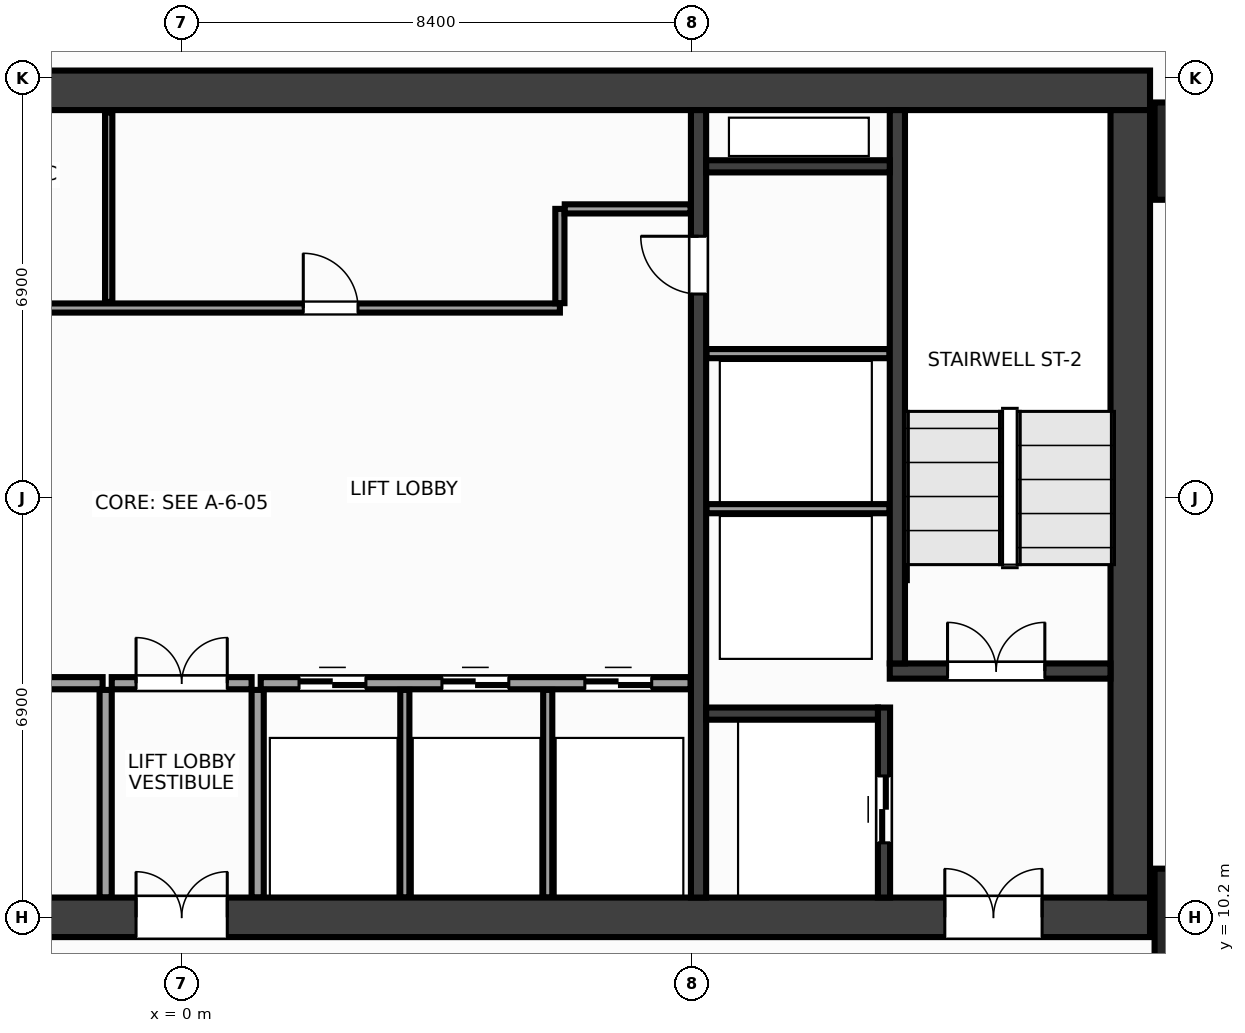
"""IFC4 building model, lengths in metres.
Left out: names, types, materials, properties, quantities, classifications, styles, units other than length and angle.
Written with IfcOpenShell. Run it as: python <this file> out.ifc"""

import sys

from ifc_helpers import new_model, si_unit, direction, frame, frame_2d, origin, origin_2d, place, context, subcontext, project, spatial, rectangle, extrude, source, transform, mapped, element, fill, save


model = new_model("IFC4")
c1 = context("Model", 3, precision=1e-05, world=origin(), true_north=direction((0.0, 1.0)))
c2 = subcontext(c1, "Body", "Model", "MODEL_VIEW")
j1 = project(units=[si_unit("LENGTHUNIT", "METRE"), si_unit("PLANEANGLEUNIT", "RADIAN")], contexts=[c1])
p1 = place(None, origin())
s1 = spatial("IfcSite", under=j1, at=p1, CompositionType="ELEMENT")
p2 = place(p1, origin())
s2 = spatial("IfcBuilding", under=s1, at=p2, CompositionType="ELEMENT")
p3 = place(p2, frame((0.0, 0.0, 149.6)))
s3 = spatial("IfcBuildingStorey", under=s2, at=p3, CompositionType="ELEMENT", Elevation=149.6)
m1 = source(origin(), c2, "Body", "SweptSolid", [
    extrude(rectangle(XDim=31.85, YDim=0.65, at=frame_2d((15.925, 0.0))), origin(), (0.0, 0.0, 1.0), 3.6),
])
p4 = place(p3, frame((-15.925, 23.8, 0.0), z_axis=(0.0, 0.0, 1.0), x_axis=(1.0, 0.0, 0.0)))
e1 = element("IfcWall", 1, at=p4, inside=s3, PredefinedType="SHEAR", context=c2, shape_type="MappedRepresentation", body=[
    mapped(m1, transform((0.0, 0.0, 0.0), x_axis=(1.0, 0.0, 0.0), y_axis=(0.0, 1.0, 0.0), z_axis=(0.0, 0.0, 1.0), scale=1.0)),
])
p5 = place(p3, frame((-15.925, 10.2, 0.0), z_axis=(0.0, 0.0, 1.0), x_axis=(1.0, 0.0, 0.0)))
e2 = element("IfcWall", 2, at=p5, inside=s3, PredefinedType="SHEAR", context=c2, shape_type="MappedRepresentation", body=[
    mapped(m1, transform((0.0, 0.0, 0.0), x_axis=(1.0, 0.0, 0.0), y_axis=(0.0, 1.0, 0.0), z_axis=(0.0, 0.0, 1.0), scale=1.0)),
])
p6 = place(p5, frame((1.775, 0.0, 0.0)))
e3 = element("IfcOpeningElement", 3, at=p6, cuts=e2, PredefinedType="OPENING", context=c2, shape_type="SweptSolid", body=[
    extrude(rectangle(XDim=1.6, YDim=2.15, at=frame_2d((0.8, 1.075))), frame((0.0, 0.337, 0.0), z_axis=(0.0, -1.0, 0.0), x_axis=(1.0, 0.0, 0.0)), (0.0, 0.0, 1.0), 0.674),
])
p7 = place(p5, frame((28.475, 0.0, 0.0)))
e4 = element("IfcOpeningElement", 4, at=p7, cuts=e2, PredefinedType="OPENING", context=c2, shape_type="SweptSolid", body=[
    extrude(rectangle(XDim=1.6, YDim=2.15, at=frame_2d((0.8, 1.075))), frame((0.0, 0.337, 0.0), z_axis=(0.0, -1.0, 0.0), x_axis=(1.0, 0.0, 0.0)), (0.0, 0.0, 1.0), 0.674),
])
p8 = place(p5, frame((15.175, 0.0, 0.0)))
e5 = element("IfcOpeningElement", 5, at=p8, cuts=e2, PredefinedType="OPENING", context=c2, shape_type="SweptSolid", body=[
    extrude(rectangle(XDim=1.5, YDim=2.2, at=frame_2d((0.75, 1.1))), frame((0.0, 0.337, 0.0), z_axis=(0.0, -1.0, 0.0), x_axis=(1.0, 0.0, 0.0)), (0.0, 0.0, 1.0), 0.674),
])
m2 = source(origin(), c2, "Body", "SweptSolid", [
    extrude(rectangle(XDim=12.95, YDim=0.65, at=frame_2d((6.475, 0.0))), origin(), (0.0, 0.0, 1.0), 3.6),
])
p9 = place(p3, frame((15.6, 10.525, 0.0), z_axis=(0.0, 0.0, 1.0), x_axis=(0.0, 1.0, 0.0)))
e6 = element("IfcWall", 6, at=p9, inside=s3, PredefinedType="SHEAR", context=c2, shape_type="MappedRepresentation", body=[
    mapped(m2, transform((0.0, 0.0, 0.0), x_axis=(1.0, 0.0, 0.0), y_axis=(0.0, 1.0, 0.0), z_axis=(0.0, 0.0, 1.0), scale=1.0)),
])
m3 = source(origin(), c2, "Body", "SweptSolid", [
    extrude(rectangle(XDim=12.95, YDim=0.25, at=frame_2d((6.475, 0.0))), origin(), (0.0, 0.0, 1.0), 3.6),
])
p10 = place(p3, frame((8.5, 10.525, 0.0), z_axis=(0.0, 0.0, 1.0), x_axis=(0.0, 1.0, 0.0)))
e7 = element("IfcWall", 7, at=p10, inside=s3, PredefinedType="SHEAR", context=c2, shape_type="MappedRepresentation", body=[
    mapped(m3, transform((0.0, 0.0, 0.0), x_axis=(1.0, 0.0, 0.0), y_axis=(0.0, 1.0, 0.0), z_axis=(0.0, 0.0, 1.0), scale=1.0)),
])
p11 = place(p10, frame((9.925, 0.0, 0.0)))
e8 = element("IfcOpeningElement", 8, at=p11, cuts=e7, PredefinedType="OPENING", context=c2, shape_type="SweptSolid", body=[
    extrude(rectangle(XDim=0.95, YDim=2.15, at=frame_2d((0.475, 1.075))), frame((0.0, 0.137, 0.0), z_axis=(0.0, -1.0, 0.0), x_axis=(1.0, 0.0, 0.0)), (0.0, 0.0, 1.0), 0.274),
])
m4 = source(origin(), c2, "Body", "SweptSolid", [
    extrude(rectangle(XDim=3.63, YDim=0.25, at=frame_2d((1.815, 0.0))), origin(), (0.0, 0.0, 1.0), 3.6),
])
p12 = place(p3, frame((11.645, 14.25, 0.0), z_axis=(0.0, 0.0, 1.0), x_axis=(1.0, 0.0, 0.0)))
e9 = element("IfcWall", 9, at=p12, inside=s3, PredefinedType="SHEAR", context=c2, shape_type="MappedRepresentation", body=[
    mapped(m4, transform((0.0, 0.0, 0.0), x_axis=(1.0, 0.0, 0.0), y_axis=(0.0, 1.0, 0.0), z_axis=(0.0, 0.0, 1.0), scale=1.0)),
])
p13 = place(p12, frame((0.95, 0.0, 0.0)))
e10 = element("IfcOpeningElement", 10, at=p13, cuts=e9, PredefinedType="OPENING", context=c2, shape_type="SweptSolid", body=[
    extrude(rectangle(XDim=1.6, YDim=2.15, at=frame_2d((0.8, 1.075))), frame((0.0, 0.137, 0.0), z_axis=(0.0, -1.0, 0.0), x_axis=(1.0, 0.0, 0.0)), (0.0, 0.0, 1.0), 0.274),
])
m5 = source(origin(), c2, "Body", "SweptSolid", [
    extrude(rectangle(XDim=9.1, YDim=0.25, at=frame_2d((4.55, 0.0))), origin(), (0.0, 0.0, 1.0), 3.6),
])
p14 = place(p3, frame((11.77, 14.375, 0.0), z_axis=(0.0, 0.0, 1.0), x_axis=(0.0, 1.0, 0.0)))
e11 = element("IfcWall", 11, at=p14, inside=s3, PredefinedType="SHEAR", context=c2, shape_type="MappedRepresentation", body=[
    mapped(m5, transform((0.0, 0.0, 0.0), x_axis=(1.0, 0.0, 0.0), y_axis=(0.0, 1.0, 0.0), z_axis=(0.0, 0.0, 1.0), scale=1.0)),
])
m6 = source(origin(), c2, "Body", "SweptSolid", [
    extrude(rectangle(XDim=3.125, YDim=0.2, at=frame_2d((1.562, 0.0))), origin(), (0.0, 0.0, 1.0), 3.6),
])
p15 = place(p3, frame((11.55, 10.525, 0.0), z_axis=(0.0, 0.0, 1.0), x_axis=(0.0, 1.0, 0.0)))
e12 = element("IfcWall", 12, at=p15, inside=s3, PredefinedType="SHEAR", context=c2, shape_type="MappedRepresentation", body=[
    mapped(m6, transform((0.0, 0.0, 0.0), x_axis=(1.0, 0.0, 0.0), y_axis=(0.0, 1.0, 0.0), z_axis=(0.0, 0.0, 1.0), scale=1.0)),
])
p16 = place(p15, frame((0.9, 0.0, 0.0)))
e13 = element("IfcOpeningElement", 13, at=p16, cuts=e12, PredefinedType="OPENING", context=c2, shape_type="SweptSolid", body=[
    extrude(rectangle(XDim=1.1, YDim=2.15, at=frame_2d((0.55, 1.075))), frame((0.0, 0.112, 0.0), z_axis=(0.0, -1.0, 0.0), x_axis=(1.0, 0.0, 0.0)), (0.0, 0.0, 1.0), 0.224),
])
m7 = source(origin(), c2, "Body", "SweptSolid", [
    extrude(rectangle(XDim=2.825, YDim=0.2, at=frame_2d((1.413, 0.0))), origin(), (0.0, 0.0, 1.0), 3.6),
])
p17 = place(p3, frame((8.625, 13.55, 0.0), z_axis=(0.0, 0.0, 1.0), x_axis=(1.0, 0.0, 0.0)))
e14 = element("IfcWall", 14, at=p17, inside=s3, PredefinedType="SHEAR", context=c2, shape_type="MappedRepresentation", body=[
    mapped(m7, transform((0.0, 0.0, 0.0), x_axis=(1.0, 0.0, 0.0), y_axis=(0.0, 1.0, 0.0), z_axis=(0.0, 0.0, 1.0), scale=1.0)),
])
m8 = source(origin(), c2, "Body", "SweptSolid", [
    extrude(rectangle(XDim=3.02, YDim=0.2, at=frame_2d((1.51, 0.0))), origin(), (0.0, 0.0, 1.0), 3.6),
])
p18 = place(p3, frame((8.625, 22.55, 0.0), z_axis=(0.0, 0.0, 1.0), x_axis=(1.0, 0.0, 0.0)))
e15 = element("IfcWall", 15, at=p18, inside=s3, PredefinedType="SHEAR", context=c2, shape_type="MappedRepresentation", body=[
    mapped(m8, transform((0.0, 0.0, 0.0), x_axis=(1.0, 0.0, 0.0), y_axis=(0.0, 1.0, 0.0), z_axis=(0.0, 0.0, 1.0), scale=1.0)),
])
m9 = source(origin(), c2, "Body", "SweptSolid", [
    extrude(rectangle(XDim=1.6, YDim=1.6, at=origin_2d()), origin(), (0.0, 0.0, 1.0), 3.6),
])
for number, where, z_axis, x_axis in (
    (16, (16.8, 10.2, 0.0), (0.0, 0.0, 1.0), (1.0, 0.0, 0.0)),
    (17, (16.8, 22.8, 0.0), (0.0, 0.0, 1.0), (1.0, 0.0, 0.0)),
):
    element("IfcColumn", number, at=place(p3, frame(where, z_axis=z_axis, x_axis=x_axis)), inside=s3, PredefinedType="COLUMN", context=c2, shape_type="MappedRepresentation", body=[
        mapped(m9, transform((0.0, 0.0, 0.0), x_axis=(1.0, 0.0, 0.0), y_axis=(0.0, 1.0, 0.0), z_axis=(0.0, 0.0, 1.0), scale=1.0)),
    ])
m10 = source(origin(), c2, "Body", "SweptSolid", [
    extrude(rectangle(XDim=3.01, YDim=0.15, at=frame_2d((1.505, 0.0))), origin(), (0.0, 0.0, 1.0), 3.38),
])
for number, where, z_axis, x_axis in (
    (18, (8.63, 16.92, 0.0), (0.0, 0.0, 1.0), (1.0, 0.0, 0.0)),
    (19, (8.63, 19.47, 0.0), (0.0, 0.0, 1.0), (1.0, 0.0, 0.0)),
):
    element("IfcWall", number, at=place(p3, frame(where, z_axis=z_axis, x_axis=x_axis)), inside=s3, PredefinedType="PARTITIONING", context=c2, shape_type="MappedRepresentation", body=[
        mapped(m10, transform((0.0, 0.0, 0.0), x_axis=(1.0, 0.0, 0.0), y_axis=(0.0, 1.0, 0.0), z_axis=(0.0, 0.0, 1.0), scale=1.0)),
    ])
m11 = source(origin(), c2, "Body", "SweptSolid", [
    extrude(rectangle(XDim=7.07, YDim=0.2, at=frame_2d((3.535, 0.0))), origin(), (0.0, 0.0, 1.0), 3.38),
])
p19 = place(p3, frame((-8.37, 14.05, 0.0), z_axis=(0.0, 0.0, 1.0), x_axis=(1.0, 0.0, 0.0)))
e20 = element("IfcWall", 20, at=p19, inside=s3, PredefinedType="PARTITIONING", context=c2, shape_type="MappedRepresentation", body=[
    mapped(m11, transform((0.0, 0.0, 0.0), x_axis=(1.0, 0.0, 0.0), y_axis=(0.0, 1.0, 0.0), z_axis=(0.0, 0.0, 1.0), scale=1.0)),
])
p20 = place(p19, frame((2.8, 0.0, 0.0)))
e21 = element("IfcOpeningElement", 21, at=p20, cuts=e20, PredefinedType="OPENING", context=c2, shape_type="SweptSolid", body=[
    extrude(rectangle(XDim=0.98, YDim=2.15, at=frame_2d((0.49, 1.075))), frame((0.0, 0.112, 0.0), z_axis=(0.0, -1.0, 0.0), x_axis=(1.0, 0.0, 0.0)), (0.0, 0.0, 1.0), 0.224),
])
p21 = place(p3, frame((1.3, 14.05, 0.0), z_axis=(0.0, 0.0, 1.0), x_axis=(1.0, 0.0, 0.0)))
e22 = element("IfcWall", 22, at=p21, inside=s3, PredefinedType="PARTITIONING", context=c2, shape_type="MappedRepresentation", body=[
    mapped(m11, transform((0.0, 0.0, 0.0), x_axis=(1.0, 0.0, 0.0), y_axis=(0.0, 1.0, 0.0), z_axis=(0.0, 0.0, 1.0), scale=1.0)),
])
p22 = place(p21, frame((0.63, 0.0, 0.0)))
e23 = element("IfcOpeningElement", 23, at=p22, cuts=e22, PredefinedType="OPENING", context=c2, shape_type="SweptSolid", body=[
    extrude(rectangle(XDim=1.1, YDim=2.15, at=frame_2d((0.55, 1.075))), frame((0.0, 0.112, 0.0), z_axis=(0.0, -1.0, 0.0), x_axis=(1.0, 0.0, 0.0)), (0.0, 0.0, 1.0), 0.224),
])
p23 = place(p21, frame((2.98, 0.0, 0.0)))
e24 = element("IfcOpeningElement", 24, at=p23, cuts=e22, PredefinedType="OPENING", context=c2, shape_type="SweptSolid", body=[
    extrude(rectangle(XDim=1.1, YDim=2.15, at=frame_2d((0.55, 1.075))), frame((0.0, 0.112, 0.0), z_axis=(0.0, -1.0, 0.0), x_axis=(1.0, 0.0, 0.0)), (0.0, 0.0, 1.0), 0.224),
])
p24 = place(p21, frame((5.33, 0.0, 0.0)))
e25 = element("IfcOpeningElement", 25, at=p24, cuts=e22, PredefinedType="OPENING", context=c2, shape_type="SweptSolid", body=[
    extrude(rectangle(XDim=1.1, YDim=2.15, at=frame_2d((0.55, 1.075))), frame((0.0, 0.112, 0.0), z_axis=(0.0, -1.0, 0.0), x_axis=(1.0, 0.0, 0.0)), (0.0, 0.0, 1.0), 0.224),
])
m12 = source(origin(), c2, "Body", "SweptSolid", [
    extrude(rectangle(XDim=3.415, YDim=0.2, at=frame_2d((1.708, 0.0))), origin(), (0.0, 0.0, 1.0), 3.38),
])
for number, where, z_axis, x_axis in (
    (26, (-1.25, 10.525, 0.0), (0.0, 0.0, 1.0), (0.0, 1.0, 0.0)),
    (27, (1.25, 10.525, 0.0), (0.0, 0.0, 1.0), (0.0, 1.0, 0.0)),
):
    element("IfcWall", number, at=place(p3, frame(where, z_axis=z_axis, x_axis=x_axis)), inside=s3, PredefinedType="PARTITIONING", context=c2, shape_type="MappedRepresentation", body=[
        mapped(m12, transform((0.0, 0.0, 0.0), x_axis=(1.0, 0.0, 0.0), y_axis=(0.0, 1.0, 0.0), z_axis=(0.0, 0.0, 1.0), scale=1.0)),
    ])
m13 = source(origin(), c2, "Body", "SweptSolid", [
    extrude(rectangle(XDim=2.3, YDim=0.2, at=frame_2d((1.15, 0.0))), origin(), (0.0, 0.0, 1.0), 3.38),
])
p25 = place(p3, frame((-1.15, 14.05, 0.0), z_axis=(0.0, 0.0, 1.0), x_axis=(1.0, 0.0, 0.0)))
e28 = element("IfcWall", 28, at=p25, inside=s3, PredefinedType="PARTITIONING", context=c2, shape_type="MappedRepresentation", body=[
    mapped(m13, transform((0.0, 0.0, 0.0), x_axis=(1.0, 0.0, 0.0), y_axis=(0.0, 1.0, 0.0), z_axis=(0.0, 0.0, 1.0), scale=1.0)),
])
p26 = place(p25, frame((0.4, 0.0, 0.0)))
e29 = element("IfcOpeningElement", 29, at=p26, cuts=e28, PredefinedType="OPENING", context=c2, shape_type="SweptSolid", body=[
    extrude(rectangle(XDim=1.5, YDim=2.2, at=frame_2d((0.75, 1.1))), frame((0.0, 0.112, 0.0), z_axis=(0.0, -1.0, 0.0), x_axis=(1.0, 0.0, 0.0)), (0.0, 0.0, 1.0), 0.224),
])
m14 = source(origin(), c2, "Body", "SweptSolid", [
    extrude(rectangle(XDim=14.59, YDim=0.15, at=frame_2d((7.295, 0.0))), origin(), (0.0, 0.0, 1.0), 3.38),
])
p27 = place(p3, frame((-8.37, 20.22, 0.0), z_axis=(0.0, 0.0, 1.0), x_axis=(1.0, 0.0, 0.0)))
e30 = element("IfcWall", 30, at=p27, inside=s3, PredefinedType="PARTITIONING", context=c2, shape_type="MappedRepresentation", body=[
    mapped(m14, transform((0.0, 0.0, 0.0), x_axis=(1.0, 0.0, 0.0), y_axis=(0.0, 1.0, 0.0), z_axis=(0.0, 0.0, 1.0), scale=1.0)),
])
p28 = place(p27, frame((1.36, 0.0, 0.0)))
e31 = element("IfcOpeningElement", 31, at=p28, cuts=e30, PredefinedType="OPENING", context=c2, shape_type="SweptSolid", body=[
    extrude(rectangle(XDim=0.9, YDim=2.15, at=frame_2d((0.45, 1.075))), frame((0.0, 0.087, 0.0), z_axis=(0.0, -1.0, 0.0), x_axis=(1.0, 0.0, 0.0)), (0.0, 0.0, 1.0), 0.174),
])
p29 = place(p27, frame((4.92, 0.0, 0.0)))
e32 = element("IfcOpeningElement", 32, at=p29, cuts=e30, PredefinedType="OPENING", context=c2, shape_type="SweptSolid", body=[
    extrude(rectangle(XDim=0.9, YDim=2.15, at=frame_2d((0.45, 1.075))), frame((0.0, 0.087, 0.0), z_axis=(0.0, -1.0, 0.0), x_axis=(1.0, 0.0, 0.0)), (0.0, 0.0, 1.0), 0.174),
])
p30 = place(p27, frame((10.37, 0.0, 0.0)))
e33 = element("IfcOpeningElement", 33, at=p30, cuts=e30, PredefinedType="OPENING", context=c2, shape_type="SweptSolid", body=[
    extrude(rectangle(XDim=0.9, YDim=2.15, at=frame_2d((0.45, 1.075))), frame((0.0, 0.087, 0.0), z_axis=(0.0, -1.0, 0.0), x_axis=(1.0, 0.0, 0.0)), (0.0, 0.0, 1.0), 0.174),
])
m15 = source(origin(), c2, "Body", "SweptSolid", [
    extrude(rectangle(XDim=1.55, YDim=0.15, at=frame_2d((0.775, 0.0))), origin(), (0.0, 0.0, 1.0), 3.38),
])
p31 = place(p3, frame((6.22, 20.3, 0.0), z_axis=(0.0, 0.0, 1.0), x_axis=(0.0, 1.0, 0.0)))
e34 = element("IfcWall", 34, at=p31, inside=s3, PredefinedType="PARTITIONING", context=c2, shape_type="MappedRepresentation", body=[
    mapped(m15, transform((0.0, 0.0, 0.0), x_axis=(1.0, 0.0, 0.0), y_axis=(0.0, 1.0, 0.0), z_axis=(0.0, 0.0, 1.0), scale=1.0)),
])
m16 = source(origin(), c2, "Body", "SweptSolid", [
    extrude(rectangle(XDim=2.07, YDim=0.15, at=frame_2d((1.035, 0.0))), origin(), (0.0, 0.0, 1.0), 3.38),
])
p32 = place(p3, frame((6.3, 21.85, 0.0), z_axis=(0.0, 0.0, 1.0), x_axis=(1.0, 0.0, 0.0)))
e35 = element("IfcWall", 35, at=p32, inside=s3, PredefinedType="PARTITIONING", context=c2, shape_type="MappedRepresentation", body=[
    mapped(m16, transform((0.0, 0.0, 0.0), x_axis=(1.0, 0.0, 0.0), y_axis=(0.0, 1.0, 0.0), z_axis=(0.0, 0.0, 1.0), scale=1.0)),
])
m17 = source(origin(), c2, "Body", "SweptSolid", [
    extrude(rectangle(XDim=3.415, YDim=0.15, at=frame_2d((1.708, 0.0))), origin(), (0.0, 0.0, 1.0), 3.38),
])
for number, where, z_axis, x_axis in (
    (36, (3.67, 10.525, 0.0), (0.0, 0.0, 1.0), (0.0, 1.0, 0.0)),
    (37, (6.02, 10.525, 0.0), (0.0, 0.0, 1.0), (0.0, 1.0, 0.0)),
):
    element("IfcWall", number, at=place(p3, frame(where, z_axis=z_axis, x_axis=x_axis)), inside=s3, PredefinedType="PARTITIONING", context=c2, shape_type="MappedRepresentation", body=[
        mapped(m17, transform((0.0, 0.0, 0.0), x_axis=(1.0, 0.0, 0.0), y_axis=(0.0, 1.0, 0.0), z_axis=(0.0, 0.0, 1.0), scale=1.0)),
    ])
m18 = source(origin(), c2, "Body", "SweptSolid", [
    extrude(rectangle(XDim=3.115, YDim=0.12, at=frame_2d((1.558, 0.0))), origin(), (0.0, 0.0, 1.0), 3.38),
])
p33 = place(p3, frame((-1.2, 20.32, 0.0), z_axis=(0.0, 0.0, 1.0), x_axis=(0.0, 1.0, 0.0)))
e38 = element("IfcWall", 38, at=p33, inside=s3, PredefinedType="PARTITIONING", context=c2, shape_type="MappedRepresentation", body=[
    mapped(m18, transform((0.0, 0.0, 0.0), x_axis=(1.0, 0.0, 0.0), y_axis=(0.0, 1.0, 0.0), z_axis=(0.0, 0.0, 1.0), scale=1.0)),
])
m19 = source(origin(), c2, "Body", "SweptSolid", [
    extrude(rectangle(XDim=1.6, YDim=2.15, at=frame_2d((0.8, 1.075))), frame((0.0, 0.025, 0.0), z_axis=(0.0, -1.0, 0.0), x_axis=(1.0, 0.0, 0.0)), (0.0, 0.0, 1.0), 0.05),
])
p34 = place(p13, origin())
e39 = element("IfcDoor", 39, at=p34, inside=s3, OperationType="DOUBLE_DOOR_SINGLE_SWING", PredefinedType="DOOR", context=c2, shape_type="MappedRepresentation", body=[
    mapped(m19, transform((0.0, 0.0, 0.0), x_axis=(1.0, 0.0, 0.0), y_axis=(0.0, 1.0, 0.0), z_axis=(0.0, 0.0, 1.0), scale=1.0)),
])
fill(e10, e39)
p35 = place(p7, origin())
e40 = element("IfcDoor", 40, at=p35, inside=s3, OperationType="DOUBLE_DOOR_SINGLE_SWING", PredefinedType="DOOR", context=c2, shape_type="MappedRepresentation", body=[
    mapped(m19, transform((0.0, 0.0, 0.0), x_axis=(1.0, 0.0, 0.0), y_axis=(0.0, 1.0, 0.0), z_axis=(0.0, 0.0, 1.0), scale=1.0)),
])
fill(e4, e40)
m20 = source(origin(), c2, "Body", "SweptSolid", [
    extrude(rectangle(XDim=1.1, YDim=2.15, at=frame_2d((0.55, 1.075))), frame((0.0, 0.025, 0.0), z_axis=(0.0, -1.0, 0.0), x_axis=(1.0, 0.0, 0.0)), (0.0, 0.0, 1.0), 0.05),
])
p36 = place(p16, origin())
e41 = element("IfcDoor", 41, at=p36, inside=s3, OperationType="DOUBLE_DOOR_SLIDING", PredefinedType="DOOR", context=c2, shape_type="MappedRepresentation", body=[
    mapped(m20, transform((0.0, 0.0, 0.0), x_axis=(1.0, 0.0, 0.0), y_axis=(0.0, 1.0, 0.0), z_axis=(0.0, 0.0, 1.0), scale=1.0)),
])
fill(e13, e41)
m21 = source(origin(), c2, "Body", "SweptSolid", [
    extrude(rectangle(XDim=0.95, YDim=2.15, at=frame_2d((0.475, 1.075))), frame((0.0, 0.025, 0.0), z_axis=(0.0, -1.0, 0.0), x_axis=(1.0, 0.0, 0.0)), (0.0, 0.0, 1.0), 0.05),
])
p37 = place(p11, origin())
e42 = element("IfcDoor", 42, at=p37, inside=s3, OperationType="SINGLE_SWING_RIGHT", PredefinedType="DOOR", context=c2, shape_type="MappedRepresentation", body=[
    mapped(m21, transform((0.0, 0.0, 0.0), x_axis=(1.0, 0.0, 0.0), y_axis=(0.0, 1.0, 0.0), z_axis=(0.0, 0.0, 1.0), scale=1.0)),
])
fill(e8, e42)
p38 = place(p22, origin())
e43 = element("IfcDoor", 43, at=p38, inside=s3, OperationType="DOUBLE_DOOR_SLIDING", PredefinedType="DOOR", context=c2, shape_type="MappedRepresentation", body=[
    mapped(m20, transform((0.0, 0.0, 0.0), x_axis=(1.0, 0.0, 0.0), y_axis=(0.0, 1.0, 0.0), z_axis=(0.0, 0.0, 1.0), scale=1.0)),
])
fill(e23, e43)
p39 = place(p23, origin())
e44 = element("IfcDoor", 44, at=p39, inside=s3, OperationType="DOUBLE_DOOR_SLIDING", PredefinedType="DOOR", context=c2, shape_type="MappedRepresentation", body=[
    mapped(m20, transform((0.0, 0.0, 0.0), x_axis=(1.0, 0.0, 0.0), y_axis=(0.0, 1.0, 0.0), z_axis=(0.0, 0.0, 1.0), scale=1.0)),
])
fill(e24, e44)
p40 = place(p24, origin())
e45 = element("IfcDoor", 45, at=p40, inside=s3, OperationType="DOUBLE_DOOR_SLIDING", PredefinedType="DOOR", context=c2, shape_type="MappedRepresentation", body=[
    mapped(m20, transform((0.0, 0.0, 0.0), x_axis=(1.0, 0.0, 0.0), y_axis=(0.0, 1.0, 0.0), z_axis=(0.0, 0.0, 1.0), scale=1.0)),
])
fill(e25, e45)
m22 = source(origin(), c2, "Body", "SweptSolid", [
    extrude(rectangle(XDim=1.5, YDim=2.2, at=frame_2d((0.75, 1.1))), frame((0.0, 0.025, 0.0), z_axis=(0.0, -1.0, 0.0), x_axis=(1.0, 0.0, 0.0)), (0.0, 0.0, 1.0), 0.05),
])
p41 = place(p26, origin())
e46 = element("IfcDoor", 46, at=p41, inside=s3, OperationType="DOUBLE_DOOR_SINGLE_SWING", PredefinedType="DOOR", context=c2, shape_type="MappedRepresentation", body=[
    mapped(m22, transform((0.0, 0.0, 0.0), x_axis=(1.0, 0.0, 0.0), y_axis=(0.0, 1.0, 0.0), z_axis=(0.0, 0.0, 1.0), scale=1.0)),
])
fill(e29, e46)
p42 = place(p8, origin())
e47 = element("IfcDoor", 47, at=p42, inside=s3, OperationType="DOUBLE_DOOR_SINGLE_SWING", PredefinedType="DOOR", context=c2, shape_type="MappedRepresentation", body=[
    mapped(m22, transform((0.0, 0.0, 0.0), x_axis=(1.0, 0.0, 0.0), y_axis=(0.0, 1.0, 0.0), z_axis=(0.0, 0.0, 1.0), scale=1.0)),
])
fill(e5, e47)
m23 = source(origin(), c2, "Body", "SweptSolid", [
    extrude(rectangle(XDim=0.9, YDim=2.15, at=frame_2d((0.45, 1.075))), frame((0.0, 0.025, 0.0), z_axis=(0.0, -1.0, 0.0), x_axis=(1.0, 0.0, 0.0)), (0.0, 0.0, 1.0), 0.05),
])
p43 = place(p30, origin())
e48 = element("IfcDoor", 48, at=p43, inside=s3, OperationType="SINGLE_SWING_LEFT", PredefinedType="DOOR", context=c2, shape_type="MappedRepresentation", body=[
    mapped(m23, transform((0.0, 0.0, 0.0), x_axis=(1.0, 0.0, 0.0), y_axis=(0.0, 1.0, 0.0), z_axis=(0.0, 0.0, 1.0), scale=1.0)),
])
fill(e33, e48)
save(model, sys.argv[1])
